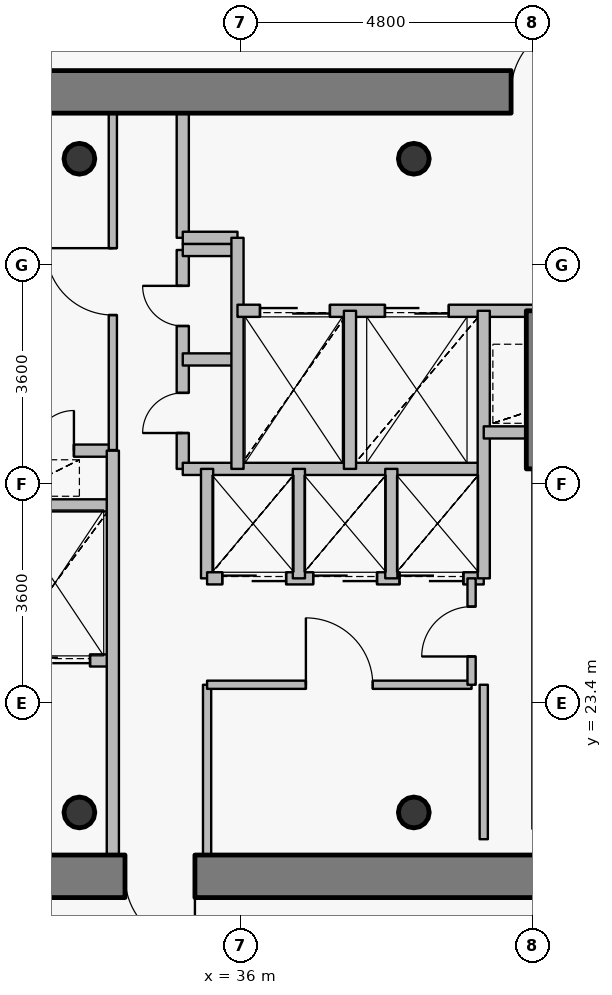
"""IFC4 building model, lengths in metres.
Left out: names, types, materials, properties, quantities, classifications, styles, units other than length and angle.
Written with IfcOpenShell. Run it as: python <this file> out.ifc"""

import sys

from ifc_helpers import new_model, si_unit, direction, frame, frame_2d, origin, origin_2d, place, context, subcontext, project, spatial, rectangle, hollow_circle, extrude, source, transform, mapped, element, fill, save


model = new_model("IFC4")
c1 = context("Model", 3, precision=1e-05, world=origin(), true_north=direction((0.0, 1.0)))
c2 = subcontext(c1, "Body", "Model", "MODEL_VIEW")
j1 = project(units=[si_unit("LENGTHUNIT", "METRE"), si_unit("PLANEANGLEUNIT", "RADIAN")], contexts=[c1])
p1 = place(None, origin())
s1 = spatial("IfcSite", under=j1, at=p1, CompositionType="ELEMENT")
p2 = place(p1, origin())
s2 = spatial("IfcBuilding", under=s1, at=p2, CompositionType="ELEMENT")
p3 = place(p2, frame((0.0, 0.0, 327.8)))
s3 = spatial("IfcBuildingStorey", under=s2, at=p3, CompositionType="ELEMENT", Elevation=327.8)
for number, where, z_axis, x_axis in (
    (1, (33.35, 21.6, 0.0), (0.0, 0.0, 1.0), (1.0, 0.0, 0.0)),
    (2, (38.85, 21.6, 0.0), (0.0, 0.0, 1.0), (1.0, 0.0, 0.0)),
    (3, (38.85, 32.35, 0.0), (0.0, 0.0, 1.0), (1.0, 0.0, 0.0)),
    (4, (33.35, 32.35, 0.0), (0.0, 0.0, 1.0), (1.0, 0.0, 0.0)),
):
    element("IfcColumn", number, at=place(p3, frame(where, z_axis=z_axis, x_axis=x_axis)), inside=s3, PredefinedType="COLUMN", context=c2, shape_type="SweptSolid", body=[
        extrude(hollow_circle(Radius=0.254, WallThickness=0.02, at=origin_2d()), origin(), (0.0, 0.0, 1.0), 3.8),
    ])
p4 = place(p3, frame((27.6, 33.45, 0.0), z_axis=(0.0, 0.0, 1.0), x_axis=(1.0, 0.0, 0.0)))
e5 = element("IfcWall", 5, at=p4, inside=s3, PredefinedType="SHEAR", context=c2, shape_type="SweptSolid", body=[
    extrude(rectangle(XDim=16.8, YDim=0.7, at=frame_2d((8.4, 0.0))), origin(), (0.0, 0.0, 1.0), 3.1),
])
p5 = place(p4, frame((12.85, 0.0, 0.0)))
e6 = element("IfcOpeningElement", 6, at=p5, cuts=e5, PredefinedType="OPENING", context=c2, shape_type="SweptSolid", body=[
    extrude(rectangle(XDim=1.15, YDim=2.15, at=origin_2d()), frame((0.575, 0.36, 1.075), z_axis=(0.0, -1.0, 0.0), x_axis=(1.0, 0.0, 0.0)), (0.0, 0.0, 1.0), 0.72),
])
p6 = place(p3, frame((44.4, 20.55, 0.0), z_axis=(0.0, 0.0, 1.0), x_axis=(-1.0, 0.0, 0.0)))
e7 = element("IfcWall", 7, at=p6, inside=s3, PredefinedType="SHEAR", context=c2, shape_type="SweptSolid", body=[
    extrude(rectangle(XDim=16.8, YDim=0.7, at=frame_2d((8.4, 0.0))), origin(), (0.0, 0.0, 1.0), 3.1),
])
p7 = place(p6, frame((13.0, 0.0, 0.0)))
e8 = element("IfcOpeningElement", 8, at=p7, cuts=e7, PredefinedType="OPENING", context=c2, shape_type="SweptSolid", body=[
    extrude(rectangle(XDim=1.15, YDim=2.15, at=origin_2d()), frame((0.575, 0.36, 1.075), z_axis=(0.0, -1.0, 0.0), x_axis=(1.0, 0.0, 0.0)), (0.0, 0.0, 1.0), 0.72),
])
p8 = place(p6, frame((9.15, 0.0, 0.0)))
e9 = element("IfcOpeningElement", 9, at=p8, cuts=e7, PredefinedType="OPENING", context=c2, shape_type="SweptSolid", body=[
    extrude(rectangle(XDim=1.15, YDim=2.15, at=origin_2d()), frame((0.575, 0.36, 1.075), z_axis=(0.0, -1.0, 0.0), x_axis=(1.0, 0.0, 0.0)), (0.0, 0.0, 1.0), 0.72),
])
p9 = place(p3, frame((40.9, 27.25, 0.0), z_axis=(0.0, 0.0, 1.0), x_axis=(0.0, 1.0, 0.0)))
e10 = element("IfcWall", 10, at=p9, inside=s3, PredefinedType="SHEAR", context=c2, shape_type="SweptSolid", body=[
    extrude(rectangle(XDim=2.6, YDim=0.4, at=frame_2d((1.3, 0.0))), origin(), (0.0, 0.0, 1.0), 3.15),
])
p10 = place(p3, frame((31.1, 27.55, 0.0), z_axis=(0.0, 0.0, 1.0), x_axis=(1.0, 0.0, 0.0)))
e11 = element("IfcWall", 11, at=p10, inside=s3, PredefinedType="PARTITIONING", context=c2, shape_type="SweptSolid", body=[
    extrude(rectangle(XDim=2.8, YDim=0.2, at=frame_2d((1.4, 0.0))), origin(), (0.0, 0.0, 1.0), 3.135),
])
p11 = place(p10, frame((1.5, 0.0, 0.0)))
e12 = element("IfcOpeningElement", 12, at=p11, cuts=e11, PredefinedType="OPENING", context=c2, shape_type="SweptSolid", body=[
    extrude(rectangle(XDim=0.66, YDim=2.05, at=origin_2d()), frame((0.33, 0.11, 1.025), z_axis=(0.0, -1.0, 0.0), x_axis=(1.0, 0.0, 0.0)), (0.0, 0.0, 1.0), 0.22),
])
p12 = place(p3, frame((32.0, 24.1, 0.0), z_axis=(0.0, 0.0, 1.0), x_axis=(1.0, 0.0, 0.0)))
e13 = element("IfcWall", 13, at=p12, inside=s3, PredefinedType="PARTITIONING", context=c2, shape_type="SweptSolid", body=[
    extrude(rectangle(XDim=1.9, YDim=0.2, at=frame_2d((0.95, 0.0))), origin(), (0.0, 0.0, 1.0), 3.135),
])
p13 = place(p12, frame((0.375, 0.0, 0.0)))
e14 = element("IfcOpeningElement", 14, at=p13, cuts=e13, PredefinedType="OPENING", context=c2, shape_type="SweptSolid", body=[
    extrude(rectangle(XDim=1.15, YDim=2.15, at=origin_2d()), frame((0.575, 0.11, 1.075), z_axis=(0.0, -1.0, 0.0), x_axis=(1.0, 0.0, 0.0)), (0.0, 0.0, 1.0), 0.22),
])
p14 = place(p3, frame((32.0, 26.65, 0.0), z_axis=(0.0, 0.0, 1.0), x_axis=(1.0, 0.0, 0.0)))
e15 = element("IfcWall", 15, at=p14, inside=s3, PredefinedType="PARTITIONING", context=c2, shape_type="SweptSolid", body=[
    extrude(rectangle(XDim=1.9, YDim=0.2, at=frame_2d((0.95, 0.0))), origin(), (0.0, 0.0, 1.0), 3.135),
])
p15 = place(p3, frame((33.9, 20.9, 0.0), z_axis=(0.0, 0.0, 1.0), x_axis=(0.0, 1.0, 0.0)))
e16 = element("IfcWall", 16, at=p15, inside=s3, PredefinedType="PARTITIONING", context=c2, shape_type="SweptSolid", body=[
    extrude(rectangle(XDim=6.65, YDim=0.2, at=frame_2d((3.325, 0.0))), origin(), (0.0, 0.0, 1.0), 3.135),
])
p16 = place(p3, frame((33.9, 27.56, 0.0), z_axis=(0.0, 0.0, 1.0), x_axis=(0.0, 1.0, 0.0)))
e17 = element("IfcWall", 17, at=p16, inside=s3, PredefinedType="PARTITIONING", context=c2, shape_type="SweptSolid", body=[
    extrude(rectangle(XDim=5.54, YDim=0.135, at=frame_2d((2.77, 0.0))), origin(), (0.0, 0.0, 1.0), 3.135),
])
p17 = place(p16, frame((2.22, 0.0, 0.0)))
e18 = element("IfcOpeningElement", 18, at=p17, cuts=e17, PredefinedType="OPENING", context=c2, shape_type="SweptSolid", body=[
    extrude(rectangle(XDim=1.1, YDim=2.15, at=origin_2d()), frame((0.55, 0.078, 1.075), z_axis=(0.0, -1.0, 0.0), x_axis=(1.0, 0.0, 0.0)), (0.0, 0.0, 1.0), 0.155),
])
p18 = place(p3, frame((35.05, 27.25, 0.0), z_axis=(0.0, 0.0, 1.0), x_axis=(0.0, 1.0, 0.0)))
e19 = element("IfcWall", 19, at=p18, inside=s3, PredefinedType="PARTITIONING", context=c2, shape_type="SweptSolid", body=[
    extrude(rectangle(XDim=3.6, YDim=0.2, at=frame_2d((1.8, 0.0))), origin(), (0.0, 0.0, 1.0), 3.55),
])
p19 = place(p18, frame((0.59, 0.0, 0.0)))
e20 = element("IfcOpeningElement", 20, at=p19, cuts=e19, PredefinedType="OPENING", context=c2, shape_type="SweptSolid", body=[
    extrude(rectangle(XDim=0.66, YDim=2.05, at=origin_2d()), frame((0.33, 0.11, 1.025), z_axis=(0.0, -1.0, 0.0), x_axis=(1.0, 0.0, 0.0)), (0.0, 0.0, 1.0), 0.22),
])
p20 = place(p18, frame((2.35, 0.0, 0.0)))
e21 = element("IfcOpeningElement", 21, at=p20, cuts=e19, PredefinedType="OPENING", context=c2, shape_type="SweptSolid", body=[
    extrude(rectangle(XDim=0.66, YDim=2.05, at=origin_2d()), frame((0.33, 0.11, 1.025), z_axis=(0.0, -1.0, 0.0), x_axis=(1.0, 0.0, 0.0)), (0.0, 0.0, 1.0), 0.22),
])
p21 = place(p3, frame((35.05, 27.25, 0.0), z_axis=(0.0, 0.0, 1.0), x_axis=(1.0, 0.0, 0.0)))
e22 = element("IfcWall", 22, at=p21, inside=s3, PredefinedType="PARTITIONING", context=c2, shape_type="SweptSolid", body=[
    extrude(rectangle(XDim=4.95, YDim=0.2, at=frame_2d((2.475, 0.0))), origin(), (0.0, 0.0, 1.0), 3.135),
])
for number, where, z_axis, x_axis in (
    (23, (35.05, 29.05, 0.0), (0.0, 0.0, 1.0), (1.0, 0.0, 0.0)),
    (24, (35.05, 30.85, 0.0), (0.0, 0.0, 1.0), (1.0, 0.0, 0.0)),
):
    element("IfcWall", number, at=place(p3, frame(where, z_axis=z_axis, x_axis=x_axis)), inside=s3, PredefinedType="PARTITIONING", context=c2, shape_type="SweptSolid", body=[
        extrude(rectangle(XDim=0.9, YDim=0.2, at=frame_2d((0.45, 0.0))), origin(), (0.0, 0.0, 1.0), 3.55),
    ])
p22 = place(p3, frame((35.05, 31.05, 0.0), z_axis=(0.0, 0.0, 1.0), x_axis=(0.0, 1.0, 0.0)))
e25 = element("IfcWall", 25, at=p22, inside=s3, PredefinedType="PARTITIONING", context=c2, shape_type="SweptSolid", body=[
    extrude(rectangle(XDim=2.05, YDim=0.2, at=frame_2d((1.025, 0.0))), origin(), (0.0, 0.0, 1.0), 3.135),
])
p23 = place(p3, frame((35.05, 31.05, 0.0), z_axis=(0.0, 0.0, 1.0), x_axis=(1.0, 0.0, 0.0)))
e26 = element("IfcWall", 26, at=p23, inside=s3, PredefinedType="PARTITIONING", context=c2, shape_type="SweptSolid", body=[
    extrude(rectangle(XDim=0.9, YDim=0.2, at=frame_2d((0.45, 0.0))), origin(), (0.0, 0.0, 1.0), 3.55),
])
p24 = place(p3, frame((35.45, 20.9, 0.0), z_axis=(0.0, 0.0, 1.0), x_axis=(0.0, 1.0, 0.0)))
e27 = element("IfcWall", 27, at=p24, inside=s3, PredefinedType="PARTITIONING", context=c2, shape_type="SweptSolid", body=[
    extrude(rectangle(XDim=2.8, YDim=0.135, at=frame_2d((1.4, 0.0))), origin(), (0.0, 0.0, 1.0), 3.135),
])
p25 = place(p3, frame((35.45, 23.7, 0.0), z_axis=(0.0, 0.0, 1.0), x_axis=(1.0, 0.0, 0.0)))
e28 = element("IfcWall", 28, at=p25, inside=s3, PredefinedType="PARTITIONING", context=c2, shape_type="SweptSolid", body=[
    extrude(rectangle(XDim=4.35, YDim=0.135, at=frame_2d((2.175, 0.0))), origin(), (0.0, 0.0, 1.0), 3.135),
])
p26 = place(p25, frame((1.625, 0.0, 0.0)))
e29 = element("IfcOpeningElement", 29, at=p26, cuts=e28, PredefinedType="OPENING", context=c2, shape_type="SweptSolid", body=[
    extrude(rectangle(XDim=1.1, YDim=2.15, at=origin_2d()), frame((0.55, 0.078, 1.075), z_axis=(0.0, -1.0, 0.0), x_axis=(1.0, 0.0, 0.0)), (0.0, 0.0, 1.0), 0.155),
])
p27 = place(p3, frame((35.45, 25.45, 0.0), z_axis=(0.0, 0.0, 1.0), x_axis=(0.0, 1.0, 0.0)))
e30 = element("IfcWall", 30, at=p27, inside=s3, PredefinedType="PARTITIONING", context=c2, shape_type="SweptSolid", body=[
    extrude(rectangle(XDim=1.8, YDim=0.2, at=frame_2d((0.9, 0.0))), origin(), (0.0, 0.0, 1.0), 3.55),
])
p28 = place(p3, frame((35.45, 25.45, 0.0), z_axis=(0.0, 0.0, 1.0), x_axis=(1.0, 0.0, 0.0)))
e31 = element("IfcWall", 31, at=p28, inside=s3, PredefinedType="PARTITIONING", context=c2, shape_type="SweptSolid", body=[
    extrude(rectangle(XDim=4.55, YDim=0.2, at=frame_2d((2.275, 0.0))), origin(), (0.0, 0.0, 1.0), 3.135),
])
p29 = place(p28, frame((0.25, 0.0, 0.0)))
e32 = element("IfcOpeningElement", 32, at=p29, cuts=e31, PredefinedType="OPENING", context=c2, shape_type="SweptSolid", body=[
    extrude(rectangle(XDim=1.05, YDim=2.15, at=origin_2d()), frame((0.525, 0.11, 1.075), z_axis=(0.0, -1.0, 0.0), x_axis=(1.0, 0.0, 0.0)), (0.0, 0.0, 1.0), 0.22),
])
p30 = place(p28, frame((1.745, 0.0, 0.0)))
e33 = element("IfcOpeningElement", 33, at=p30, cuts=e31, PredefinedType="OPENING", context=c2, shape_type="SweptSolid", body=[
    extrude(rectangle(XDim=1.05, YDim=2.15, at=origin_2d()), frame((0.525, 0.11, 1.075), z_axis=(0.0, -1.0, 0.0), x_axis=(1.0, 0.0, 0.0)), (0.0, 0.0, 1.0), 0.22),
])
p31 = place(p28, frame((3.165, 0.0, 0.0)))
e34 = element("IfcOpeningElement", 34, at=p31, cuts=e31, PredefinedType="OPENING", context=c2, shape_type="SweptSolid", body=[
    extrude(rectangle(XDim=1.05, YDim=2.15, at=origin_2d()), frame((0.525, 0.11, 1.075), z_axis=(0.0, -1.0, 0.0), x_axis=(1.0, 0.0, 0.0)), (0.0, 0.0, 1.0), 0.22),
])
p32 = place(p3, frame((35.95, 27.25, 0.0), z_axis=(0.0, 0.0, 1.0), x_axis=(0.0, 1.0, 0.0)))
e35 = element("IfcWall", 35, at=p32, inside=s3, PredefinedType="PARTITIONING", context=c2, shape_type="SweptSolid", body=[
    extrude(rectangle(XDim=3.8, YDim=0.2, at=frame_2d((1.9, 0.0))), origin(), (0.0, 0.0, 1.0), 3.55),
])
p33 = place(p3, frame((35.95, 29.85, 0.0), z_axis=(0.0, 0.0, 1.0), x_axis=(1.0, 0.0, 0.0)))
e36 = element("IfcWall", 36, at=p33, inside=s3, PredefinedType="PARTITIONING", context=c2, shape_type="SweptSolid", body=[
    extrude(rectangle(XDim=8.49, YDim=0.2, at=frame_2d((4.245, 0.0))), origin(), (0.0, 0.0, 1.0), 3.135),
])
p34 = place(p33, frame((6.1, 0.0, 0.0)))
e37 = element("IfcOpeningElement", 37, at=p34, cuts=e36, PredefinedType="OPENING", context=c2, shape_type="SweptSolid", body=[
    extrude(rectangle(XDim=1.2, YDim=2.15, at=origin_2d()), frame((0.6, 0.11, 1.075), z_axis=(0.0, -1.0, 0.0), x_axis=(1.0, 0.0, 0.0)), (0.0, 0.0, 1.0), 0.22),
])
p35 = place(p33, frame((0.37, 0.0, 0.0)))
e38 = element("IfcOpeningElement", 38, at=p35, cuts=e36, PredefinedType="OPENING", context=c2, shape_type="SweptSolid", body=[
    extrude(rectangle(XDim=1.15, YDim=2.15, at=origin_2d()), frame((0.575, 0.11, 1.075), z_axis=(0.0, -1.0, 0.0), x_axis=(1.0, 0.0, 0.0)), (0.0, 0.0, 1.0), 0.22),
])
p36 = place(p33, frame((2.425, 0.0, 0.0)))
e39 = element("IfcOpeningElement", 39, at=p36, cuts=e36, PredefinedType="OPENING", context=c2, shape_type="SweptSolid", body=[
    extrude(rectangle(XDim=1.05, YDim=2.15, at=origin_2d()), frame((0.525, 0.11, 1.075), z_axis=(0.0, -1.0, 0.0), x_axis=(1.0, 0.0, 0.0)), (0.0, 0.0, 1.0), 0.22),
])
p37 = place(p3, frame((36.96, 25.45, 0.0), z_axis=(0.0, 0.0, 1.0), x_axis=(0.0, 1.0, 0.0)))
e40 = element("IfcWall", 40, at=p37, inside=s3, PredefinedType="PARTITIONING", context=c2, shape_type="SweptSolid", body=[
    extrude(rectangle(XDim=1.8, YDim=0.2, at=frame_2d((0.9, 0.0))), origin(), (0.0, 0.0, 1.0), 3.55),
])
p38 = place(p3, frame((37.8, 27.25, 0.0), z_axis=(0.0, 0.0, 1.0), x_axis=(0.0, 1.0, 0.0)))
e41 = element("IfcWall", 41, at=p38, inside=s3, PredefinedType="PARTITIONING", context=c2, shape_type="SweptSolid", body=[
    extrude(rectangle(XDim=2.6, YDim=0.2, at=frame_2d((1.3, 0.0))), origin(), (0.0, 0.0, 1.0), 3.55),
])
p39 = place(p3, frame((38.48, 25.45, 0.0), z_axis=(0.0, 0.0, 1.0), x_axis=(0.0, 1.0, 0.0)))
e42 = element("IfcWall", 42, at=p39, inside=s3, PredefinedType="PARTITIONING", context=c2, shape_type="SweptSolid", body=[
    extrude(rectangle(XDim=1.8, YDim=0.2, at=frame_2d((0.9, 0.0))), origin(), (0.0, 0.0, 1.0), 3.55),
])
p40 = place(p3, frame((39.8, 23.7, 0.0), z_axis=(0.0, 0.0, 1.0), x_axis=(0.0, 1.0, 0.0)))
e43 = element("IfcWall", 43, at=p40, inside=s3, PredefinedType="PARTITIONING", context=c2, shape_type="SweptSolid", body=[
    extrude(rectangle(XDim=1.75, YDim=0.135, at=frame_2d((0.875, 0.0))), origin(), (0.0, 0.0, 1.0), 3.55),
])
p41 = place(p40, frame((0.465, 0.0, 0.0)))
e44 = element("IfcOpeningElement", 44, at=p41, cuts=e43, PredefinedType="OPENING", context=c2, shape_type="SweptSolid", body=[
    extrude(rectangle(XDim=0.82, YDim=2.1, at=origin_2d()), frame((0.41, 0.078, 1.05), z_axis=(0.0, -1.0, 0.0), x_axis=(1.0, 0.0, 0.0)), (0.0, 0.0, 1.0), 0.155),
])
p42 = place(p3, frame((40.0, 25.45, 0.0), z_axis=(0.0, 0.0, 1.0), x_axis=(0.0, 1.0, 0.0)))
e45 = element("IfcWall", 45, at=p42, inside=s3, PredefinedType="PARTITIONING", context=c2, shape_type="SweptSolid", body=[
    extrude(rectangle(XDim=4.4, YDim=0.2, at=frame_2d((2.2, 0.0))), origin(), (0.0, 0.0, 1.0), 3.55),
])
p43 = place(p3, frame((40.0, 27.85, 0.0), z_axis=(0.0, 0.0, 1.0), x_axis=(1.0, 0.0, 0.0)))
e46 = element("IfcWall", 46, at=p43, inside=s3, PredefinedType="PARTITIONING", context=c2, shape_type="SweptSolid", body=[
    extrude(rectangle(XDim=0.9, YDim=0.2, at=frame_2d((0.45, 0.0))), origin(), (0.0, 0.0, 1.0), 3.55),
])
p44 = place(p3, frame((40.9, 21.33, 0.0), z_axis=(0.0, 0.0, 1.0), x_axis=(0.0, 1.0, 0.0)))
e47 = element("IfcWall", 47, at=p44, inside=s3, PredefinedType="PARTITIONING", context=c2, shape_type="SweptSolid", body=[
    extrude(rectangle(XDim=5.91, YDim=0.2, at=frame_2d((2.955, 0.0))), origin(), (0.0, 0.0, 1.0), 3.085),
])
p45 = place(p3, frame((40.0, 23.7, 0.0), z_axis=(0.0, 0.0, 1.0), x_axis=(0.0, -1.0, 0.0)))
e48 = element("IfcWall", 48, at=p45, inside=s3, PredefinedType="PARTITIONING", context=c2, shape_type="SweptSolid", body=[
    extrude(rectangle(XDim=2.54, YDim=0.135, at=frame_2d((1.27, 0.0))), origin(), (0.0, 0.0, 1.0), 3.085),
])
m1 = source(origin(), c2, "Body", "SweptSolid", [
    extrude(rectangle(XDim=1.15, YDim=2.15, at=origin_2d()), frame((0.575, 0.025, 1.075), z_axis=(0.0, -1.0, 0.0), x_axis=(1.0, 0.0, 0.0)), (0.0, 0.0, 1.0), 0.05),
])
p46 = place(p5, origin())
e49 = element("IfcDoor", 49, at=p46, inside=s3, OperationType="SINGLE_SWING_RIGHT", PredefinedType="DOOR", context=c2, shape_type="MappedRepresentation", body=[
    mapped(m1, transform((0.0, 0.0, 0.0), x_axis=(1.0, 0.0, 0.0), y_axis=(0.0, 1.0, 0.0), z_axis=(0.0, 0.0, 1.0), scale=1.0)),
])
fill(e6, e49)
p47 = place(p8, origin())
e50 = element("IfcDoor", 50, at=p47, inside=s3, OperationType="SINGLE_SWING_LEFT", PredefinedType="DOOR", context=c2, shape_type="MappedRepresentation", body=[
    mapped(m1, transform((0.0, 0.0, 0.0), x_axis=(1.0, 0.0, 0.0), y_axis=(0.0, 1.0, 0.0), z_axis=(0.0, 0.0, 1.0), scale=1.0)),
])
fill(e9, e50)
m2 = source(origin(), c2, "Body", "SweptSolid", [
    extrude(rectangle(XDim=1.15, YDim=2.15, at=origin_2d()), frame((0.575, 0.025, 1.075), z_axis=(0.0, -1.0, 0.0), x_axis=(1.0, 0.0, 0.0)), (0.0, 0.0, 1.0), 0.05),
])
p48 = place(p35, origin())
e51 = element("IfcDoor", 51, at=p48, inside=s3, OperationType="DOUBLE_DOOR_SLIDING", PredefinedType="USERDEFINED", context=c2, shape_type="MappedRepresentation", body=[
    mapped(m2, transform((0.0, 0.0, 0.0), x_axis=(1.0, 0.0, 0.0), y_axis=(0.0, 1.0, 0.0), z_axis=(0.0, 0.0, 1.0), scale=1.0)),
])
fill(e38, e51)
p49 = place(p13, origin())
e52 = element("IfcDoor", 52, at=p49, inside=s3, OperationType="DOUBLE_DOOR_SLIDING", PredefinedType="USERDEFINED", context=c2, shape_type="MappedRepresentation", body=[
    mapped(m2, transform((0.0, 0.0, 0.0), x_axis=(1.0, 0.0, 0.0), y_axis=(0.0, 1.0, 0.0), z_axis=(0.0, 0.0, 1.0), scale=1.0)),
])
fill(e14, e52)
m3 = source(origin(), c2, "Body", "SweptSolid", [
    extrude(rectangle(XDim=1.05, YDim=2.15, at=origin_2d()), frame((0.525, 0.025, 1.075), z_axis=(0.0, -1.0, 0.0), x_axis=(1.0, 0.0, 0.0)), (0.0, 0.0, 1.0), 0.05),
])
p50 = place(p36, origin())
e53 = element("IfcDoor", 53, at=p50, inside=s3, OperationType="DOUBLE_DOOR_SLIDING", PredefinedType="USERDEFINED", context=c2, shape_type="MappedRepresentation", body=[
    mapped(m3, transform((0.0, 0.0, 0.0), x_axis=(1.0, 0.0, 0.0), y_axis=(0.0, 1.0, 0.0), z_axis=(0.0, 0.0, 1.0), scale=1.0)),
])
fill(e39, e53)
p51 = place(p29, origin())
e54 = element("IfcDoor", 54, at=p51, inside=s3, OperationType="DOUBLE_DOOR_SLIDING", PredefinedType="USERDEFINED", context=c2, shape_type="MappedRepresentation", body=[
    mapped(m3, transform((0.0, 0.0, 0.0), x_axis=(1.0, 0.0, 0.0), y_axis=(0.0, 1.0, 0.0), z_axis=(0.0, 0.0, 1.0), scale=1.0)),
])
fill(e32, e54)
p52 = place(p30, origin())
e55 = element("IfcDoor", 55, at=p52, inside=s3, OperationType="DOUBLE_DOOR_SLIDING", PredefinedType="USERDEFINED", context=c2, shape_type="MappedRepresentation", body=[
    mapped(m3, transform((0.0, 0.0, 0.0), x_axis=(1.0, 0.0, 0.0), y_axis=(0.0, 1.0, 0.0), z_axis=(0.0, 0.0, 1.0), scale=1.0)),
])
fill(e33, e55)
p53 = place(p31, origin())
e56 = element("IfcDoor", 56, at=p53, inside=s3, OperationType="DOUBLE_DOOR_SLIDING", PredefinedType="USERDEFINED", context=c2, shape_type="MappedRepresentation", body=[
    mapped(m3, transform((0.0, 0.0, 0.0), x_axis=(1.0, 0.0, 0.0), y_axis=(0.0, 1.0, 0.0), z_axis=(0.0, 0.0, 1.0), scale=1.0)),
])
fill(e34, e56)
m4 = source(origin(), c2, "Body", "SweptSolid", [
    extrude(rectangle(XDim=0.66, YDim=2.05, at=origin_2d()), frame((0.33, 0.025, 1.025), z_axis=(0.0, -1.0, 0.0), x_axis=(1.0, 0.0, 0.0)), (0.0, 0.0, 1.0), 0.05),
])
p54 = place(p19, origin())
e57 = element("IfcDoor", 57, at=p54, inside=s3, OperationType="SINGLE_SWING_LEFT", PredefinedType="USERDEFINED", context=c2, shape_type="MappedRepresentation", body=[
    mapped(m4, transform((0.0, 0.0, 0.0), x_axis=(1.0, 0.0, 0.0), y_axis=(0.0, 1.0, 0.0), z_axis=(0.0, 0.0, 1.0), scale=1.0)),
])
fill(e20, e57)
p55 = place(p20, origin())
e58 = element("IfcDoor", 58, at=p55, inside=s3, OperationType="SINGLE_SWING_RIGHT", PredefinedType="USERDEFINED", context=c2, shape_type="MappedRepresentation", body=[
    mapped(m4, transform((0.0, 0.0, 0.0), x_axis=(1.0, 0.0, 0.0), y_axis=(0.0, 1.0, 0.0), z_axis=(0.0, 0.0, 1.0), scale=1.0)),
])
fill(e21, e58)
m5 = source(origin(), c2, "Body", "SweptSolid", [
    extrude(rectangle(XDim=1.1, YDim=2.15, at=origin_2d()), frame((0.55, 0.025, 1.075), z_axis=(0.0, -1.0, 0.0), x_axis=(1.0, 0.0, 0.0)), (0.0, 0.0, 1.0), 0.05),
])
p56 = place(p26, origin())
e59 = element("IfcDoor", 59, at=p56, inside=s3, OperationType="SINGLE_SWING_LEFT", PredefinedType="DOOR", context=c2, shape_type="MappedRepresentation", body=[
    mapped(m5, transform((0.0, 0.0, 0.0), x_axis=(1.0, 0.0, 0.0), y_axis=(0.0, 1.0, 0.0), z_axis=(0.0, 0.0, 1.0), scale=1.0)),
])
fill(e29, e59)
p57 = place(p17, origin())
e60 = element("IfcDoor", 60, at=p57, inside=s3, OperationType="SINGLE_SWING_RIGHT", PredefinedType="DOOR", context=c2, shape_type="MappedRepresentation", body=[
    mapped(m5, transform((0.0, 0.0, 0.0), x_axis=(1.0, 0.0, 0.0), y_axis=(0.0, 1.0, 0.0), z_axis=(0.0, 0.0, 1.0), scale=1.0)),
])
fill(e18, e60)
m6 = source(origin(), c2, "Body", "SweptSolid", [
    extrude(rectangle(XDim=0.82, YDim=2.1, at=origin_2d()), frame((0.41, 0.025, 1.05), z_axis=(0.0, -1.0, 0.0), x_axis=(1.0, 0.0, 0.0)), (0.0, 0.0, 1.0), 0.05),
])
p58 = place(p41, origin())
e61 = element("IfcDoor", 61, at=p58, inside=s3, OperationType="SINGLE_SWING_LEFT", PredefinedType="DOOR", context=c2, shape_type="MappedRepresentation", body=[
    mapped(m6, transform((0.0, 0.0, 0.0), x_axis=(1.0, 0.0, 0.0), y_axis=(0.0, 1.0, 0.0), z_axis=(0.0, 0.0, 1.0), scale=1.0)),
])
fill(e44, e61)
p59 = place(p11, origin())
e62 = element("IfcDoor", 62, at=p59, inside=s3, OperationType="SINGLE_SWING_RIGHT", PredefinedType="USERDEFINED", context=c2, shape_type="MappedRepresentation", body=[
    mapped(m4, transform((0.0, 0.0, 0.0), x_axis=(1.0, 0.0, 0.0), y_axis=(0.0, 1.0, 0.0), z_axis=(0.0, 0.0, 1.0), scale=1.0)),
])
fill(e12, e62)
save(model, sys.argv[1])
